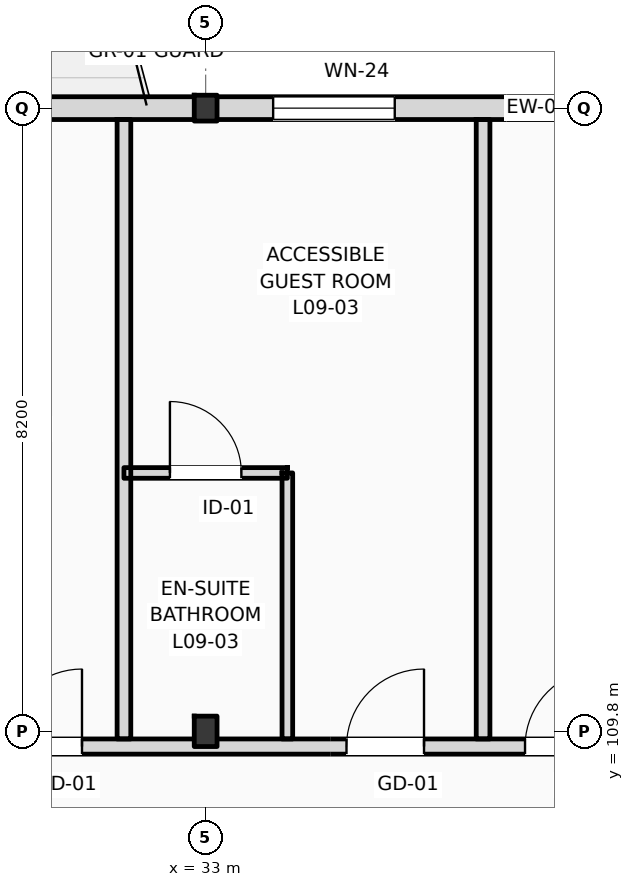
"""IFC4 building model, lengths in metres.
Left out: names, types, materials, properties, quantities, classifications, styles, units other than length and angle.
Written with IfcOpenShell. Run it as: python <this file> out.ifc"""

import sys

from ifc_helpers import new_model, si_unit, direction, frame, frame_2d, origin, origin_2d, place, context, subcontext, project, spatial, rectangle, i_section, extrude, element, fill, save


model = new_model("IFC4")
c1 = context("Model", 3, precision=1e-05, world=origin(), true_north=direction((0.0, 1.0)))
c2 = subcontext(c1, "Body", "Model", "MODEL_VIEW")
j1 = project(units=[si_unit("LENGTHUNIT", "METRE"), si_unit("PLANEANGLEUNIT", "RADIAN")], contexts=[c1])
p1 = place(None, origin())
s1 = spatial("IfcSite", under=j1, at=p1, CompositionType="ELEMENT")
p2 = place(p1, origin())
s2 = spatial("IfcBuilding", under=s1, at=p2, CompositionType="ELEMENT")
p3 = place(p2, frame((0.0, 0.0, 39.0)))
s3 = spatial("IfcBuildingStorey", under=s2, at=p3, CompositionType="ELEMENT", Elevation=39.0)
p4 = place(p3, frame((33.0, 109.8, 0.0), z_axis=(0.0, 0.0, 1.0), x_axis=(1.0, 0.0, 0.0)))
e1 = element("IfcColumn", 1, at=p4, inside=s3, PredefinedType="COLUMN", context=c2, shape_type="SweptSolid", body=[
    extrude(i_section(OverallWidth=0.3, OverallDepth=0.4, WebThickness=0.013, FlangeThickness=0.024, FilletRadius=0.027, at=origin_2d()), origin(), (0.0, 0.0, 1.0), 3.6),
])
p5 = place(p3, frame((33.0, 118.0, 0.0), z_axis=(0.0, 0.0, 1.0), x_axis=(1.0, 0.0, 0.0)))
e2 = element("IfcColumn", 2, at=p5, inside=s3, PredefinedType="COLUMN", context=c2, shape_type="SweptSolid", body=[
    extrude(i_section(OverallWidth=0.3, OverallDepth=0.34, WebThickness=0.012, FlangeThickness=0.021, FilletRadius=0.027, at=origin_2d()), origin(), (0.0, 0.0, 1.0), 3.6),
])
p6 = place(p3, frame((22.5, 118.0, 0.0), z_axis=(0.0, 0.0, 1.0), x_axis=(1.0, 0.0, 0.0)))
e3 = element("IfcWall", 3, at=p6, inside=s3, PredefinedType="STANDARD", context=c2, shape_type="SweptSolid", body=[
    extrude(rectangle(XDim=72.9, YDim=0.3, at=frame_2d((36.45, 0.0))), origin(), (0.0, 0.0, 1.0), 2.92),
])
p7 = place(p6, frame((3.6, 0.0, 0.9)))
e4 = element("IfcOpeningElement", 4, at=p7, cuts=e3, PredefinedType="OPENING", context=c2, shape_type="SweptSolid", body=[
    extrude(rectangle(XDim=1.1, YDim=1.6, at=frame_2d((0.55, 0.8))), frame((0.0, 0.16, 0.0), z_axis=(0.0, -1.0, 0.0), x_axis=(1.0, 0.0, 0.0)), (0.0, 0.0, 1.0), 0.32),
])
p8 = place(p6, frame((6.688, 0.0, 0.0)))
e5 = element("IfcOpeningElement", 5, at=p8, cuts=e3, PredefinedType="OPENING", context=c2, shape_type="SweptSolid", body=[
    extrude(rectangle(XDim=1.2, YDim=2.25, at=frame_2d((0.6, 1.125))), frame((0.0, 0.16, 0.0), z_axis=(0.0, -1.0, 0.0), x_axis=(1.0, 0.0, 0.0)), (0.0, 0.0, 1.0), 0.32),
])
p9 = place(p6, frame((11.388, 0.0, 0.9)))
e6 = element("IfcOpeningElement", 6, at=p9, cuts=e3, PredefinedType="OPENING", context=c2, shape_type="SweptSolid", body=[
    extrude(rectangle(XDim=1.6, YDim=1.75, at=frame_2d((0.8, 0.875))), frame((0.0, 0.16, 0.0), z_axis=(0.0, -1.0, 0.0), x_axis=(1.0, 0.0, 0.0)), (0.0, 0.0, 1.0), 0.32),
])
p10 = place(p6, frame((15.413, 0.0, 0.9)))
e7 = element("IfcOpeningElement", 7, at=p10, cuts=e3, PredefinedType="OPENING", context=c2, shape_type="SweptSolid", body=[
    extrude(rectangle(XDim=1.75, YDim=1.84, at=frame_2d((0.875, 0.92))), frame((0.0, 0.16, 0.0), z_axis=(0.0, -1.0, 0.0), x_axis=(1.0, 0.0, 0.0)), (0.0, 0.0, 1.0), 0.32),
])
p11 = place(p6, frame((21.245, 0.0, 0.0)))
e8 = element("IfcOpeningElement", 8, at=p11, cuts=e3, PredefinedType="OPENING", context=c2, shape_type="SweptSolid", body=[
    extrude(rectangle(XDim=1.2, YDim=2.25, at=frame_2d((0.6, 1.125))), frame((0.0, 0.16, 0.0), z_axis=(0.0, -1.0, 0.0), x_axis=(1.0, 0.0, 0.0)), (0.0, 0.0, 1.0), 0.32),
])
p12 = place(p6, frame((23.705, 0.0, 0.0)))
e9 = element("IfcOpeningElement", 9, at=p12, cuts=e3, PredefinedType="OPENING", context=c2, shape_type="SweptSolid", body=[
    extrude(rectangle(XDim=1.2, YDim=2.25, at=frame_2d((0.6, 1.125))), frame((0.0, 0.16, 0.0), z_axis=(0.0, -1.0, 0.0), x_axis=(1.0, 0.0, 0.0)), (0.0, 0.0, 1.0), 0.32),
])
p13 = place(p6, frame((28.488, 0.0, 0.9)))
e10 = element("IfcOpeningElement", 10, at=p13, cuts=e3, PredefinedType="OPENING", context=c2, shape_type="SweptSolid", body=[
    extrude(rectangle(XDim=2.6, YDim=1.84, at=frame_2d((1.3, 0.92))), frame((0.0, 0.16, 0.0), z_axis=(0.0, -1.0, 0.0), x_axis=(1.0, 0.0, 0.0)), (0.0, 0.0, 1.0), 0.32),
])
p14 = place(p6, frame((34.76, 0.0, 0.9)))
e11 = element("IfcOpeningElement", 11, at=p14, cuts=e3, PredefinedType="OPENING", context=c2, shape_type="SweptSolid", body=[
    extrude(rectangle(XDim=1.1, YDim=1.84, at=frame_2d((0.55, 0.92))), frame((0.0, 0.16, 0.0), z_axis=(0.0, -1.0, 0.0), x_axis=(1.0, 0.0, 0.0)), (0.0, 0.0, 1.0), 0.32),
])
p15 = place(p6, frame((38.143, 0.0, 0.0)))
e12 = element("IfcOpeningElement", 12, at=p15, cuts=e3, PredefinedType="OPENING", context=c2, shape_type="SweptSolid", body=[
    extrude(rectangle(XDim=1.2, YDim=2.25, at=frame_2d((0.6, 1.125))), frame((0.0, 0.16, 0.0), z_axis=(0.0, -1.0, 0.0), x_axis=(1.0, 0.0, 0.0)), (0.0, 0.0, 1.0), 0.32),
])
p16 = place(p6, frame((42.687, 0.0, 0.9)))
e13 = element("IfcOpeningElement", 13, at=p16, cuts=e3, PredefinedType="OPENING", context=c2, shape_type="SweptSolid", body=[
    extrude(rectangle(XDim=1.2, YDim=1.8, at=frame_2d((0.6, 0.9))), frame((0.0, 0.16, 0.0), z_axis=(0.0, -1.0, 0.0), x_axis=(1.0, 0.0, 0.0)), (0.0, 0.0, 1.0), 0.32),
])
p17 = place(p6, frame((47.112, 0.0, 0.9)))
e14 = element("IfcOpeningElement", 14, at=p17, cuts=e3, PredefinedType="OPENING", context=c2, shape_type="SweptSolid", body=[
    extrude(rectangle(XDim=1.35, YDim=1.84, at=frame_2d((0.675, 0.92))), frame((0.0, 0.16, 0.0), z_axis=(0.0, -1.0, 0.0), x_axis=(1.0, 0.0, 0.0)), (0.0, 0.0, 1.0), 0.32),
])
p18 = place(p6, frame((52.482, 0.0, 0.0)))
e15 = element("IfcOpeningElement", 15, at=p18, cuts=e3, PredefinedType="OPENING", context=c2, shape_type="SweptSolid", body=[
    extrude(rectangle(XDim=1.2, YDim=2.25, at=frame_2d((0.6, 1.125))), frame((0.0, 0.16, 0.0), z_axis=(0.0, -1.0, 0.0), x_axis=(1.0, 0.0, 0.0)), (0.0, 0.0, 1.0), 0.32),
])
p19 = place(p6, frame((54.942, 0.0, 0.0)))
e16 = element("IfcOpeningElement", 16, at=p19, cuts=e3, PredefinedType="OPENING", context=c2, shape_type="SweptSolid", body=[
    extrude(rectangle(XDim=1.2, YDim=2.25, at=frame_2d((0.6, 1.125))), frame((0.0, 0.16, 0.0), z_axis=(0.0, -1.0, 0.0), x_axis=(1.0, 0.0, 0.0)), (0.0, 0.0, 1.0), 0.32),
])
p20 = place(p6, frame((60.387, 0.0, 0.9)))
e17 = element("IfcOpeningElement", 17, at=p20, cuts=e3, PredefinedType="OPENING", context=c2, shape_type="SweptSolid", body=[
    extrude(rectangle(XDim=1.8, YDim=1.84, at=frame_2d((0.9, 0.92))), frame((0.0, 0.16, 0.0), z_axis=(0.0, -1.0, 0.0), x_axis=(1.0, 0.0, 0.0)), (0.0, 0.0, 1.0), 0.32),
])
p21 = place(p6, frame((66.013, 0.0, 0.9)))
e18 = element("IfcOpeningElement", 18, at=p21, cuts=e3, PredefinedType="OPENING", context=c2, shape_type="SweptSolid", body=[
    extrude(rectangle(XDim=1.35, YDim=1.84, at=frame_2d((0.675, 0.92))), frame((0.0, 0.16, 0.0), z_axis=(0.0, -1.0, 0.0), x_axis=(1.0, 0.0, 0.0)), (0.0, 0.0, 1.0), 0.32),
])
p22 = place(p6, frame((69.275, 0.0, 0.9)))
e19 = element("IfcOpeningElement", 19, at=p22, cuts=e3, PredefinedType="OPENING", context=c2, shape_type="SweptSolid", body=[
    extrude(rectangle(XDim=2.1, YDim=1.84, at=frame_2d((1.05, 0.92))), frame((0.0, 0.16, 0.0), z_axis=(0.0, -1.0, 0.0), x_axis=(1.0, 0.0, 0.0)), (0.0, 0.0, 1.0), 0.32),
])
p23 = place(p3, frame((10.65, 109.6, 0.0), z_axis=(0.0, 0.0, 1.0), x_axis=(1.0, 0.0, 0.0)))
e20 = element("IfcWall", 20, at=p23, inside=s3, PredefinedType="PARTITIONING", context=c2, shape_type="SweptSolid", body=[
    extrude(rectangle(XDim=84.61, YDim=0.2, at=frame_2d((42.305, 0.0))), origin(), (0.0, 0.0, 1.0), 2.82),
])
p24 = place(p23, frame((15.49, 0.0, 0.0)))
e21 = element("IfcOpeningElement", 21, at=p24, cuts=e20, PredefinedType="OPENING", context=c2, shape_type="SweptSolid", body=[
    extrude(rectangle(XDim=1.02, YDim=2.2, at=frame_2d((0.51, 1.1))), frame((0.0, 0.11, 0.0), z_axis=(0.0, -1.0, 0.0), x_axis=(1.0, 0.0, 0.0)), (0.0, 0.0, 1.0), 0.22),
])
p25 = place(p23, frame((19.703, 0.0, 0.0)))
e22 = element("IfcOpeningElement", 22, at=p25, cuts=e20, PredefinedType="OPENING", context=c2, shape_type="SweptSolid", body=[
    extrude(rectangle(XDim=1.02, YDim=2.2, at=frame_2d((0.51, 1.1))), frame((0.0, 0.11, 0.0), z_axis=(0.0, -1.0, 0.0), x_axis=(1.0, 0.0, 0.0)), (0.0, 0.0, 1.0), 0.22),
])
p26 = place(p23, frame((24.203, 0.0, 0.0)))
e23 = element("IfcOpeningElement", 23, at=p26, cuts=e20, PredefinedType="OPENING", context=c2, shape_type="SweptSolid", body=[
    extrude(rectangle(XDim=1.02, YDim=2.2, at=frame_2d((0.51, 1.1))), frame((0.0, 0.11, 0.0), z_axis=(0.0, -1.0, 0.0), x_axis=(1.0, 0.0, 0.0)), (0.0, 0.0, 1.0), 0.22),
])
p27 = place(p23, frame((26.552, 0.0, 0.0)))
e24 = element("IfcOpeningElement", 24, at=p27, cuts=e20, PredefinedType="OPENING", context=c2, shape_type="SweptSolid", body=[
    extrude(rectangle(XDim=1.02, YDim=2.2, at=frame_2d((0.51, 1.1))), frame((0.0, 0.11, 0.0), z_axis=(0.0, -1.0, 0.0), x_axis=(1.0, 0.0, 0.0)), (0.0, 0.0, 1.0), 0.22),
])
p28 = place(p23, frame((33.233, 0.0, 0.0)))
e25 = element("IfcOpeningElement", 25, at=p28, cuts=e20, PredefinedType="OPENING", context=c2, shape_type="SweptSolid", body=[
    extrude(rectangle(XDim=0.96, YDim=2.2, at=frame_2d((0.48, 1.1))), frame((0.0, 0.11, 0.0), z_axis=(0.0, -1.0, 0.0), x_axis=(1.0, 0.0, 0.0)), (0.0, 0.0, 1.0), 0.22),
])
p29 = place(p23, frame((35.583, 0.0, 0.0)))
e26 = element("IfcOpeningElement", 26, at=p29, cuts=e20, PredefinedType="OPENING", context=c2, shape_type="SweptSolid", body=[
    extrude(rectangle(XDim=0.96, YDim=2.2, at=frame_2d((0.48, 1.1))), frame((0.0, 0.11, 0.0), z_axis=(0.0, -1.0, 0.0), x_axis=(1.0, 0.0, 0.0)), (0.0, 0.0, 1.0), 0.22),
])
p30 = place(p23, frame((42.233, 0.0, 0.0)))
e27 = element("IfcOpeningElement", 27, at=p30, cuts=e20, PredefinedType="OPENING", context=c2, shape_type="SweptSolid", body=[
    extrude(rectangle(XDim=0.96, YDim=2.2, at=frame_2d((0.48, 1.1))), frame((0.0, 0.11, 0.0), z_axis=(0.0, -1.0, 0.0), x_axis=(1.0, 0.0, 0.0)), (0.0, 0.0, 1.0), 0.22),
])
p31 = place(p23, frame((46.983, 0.0, 0.0)))
e28 = element("IfcOpeningElement", 28, at=p31, cuts=e20, PredefinedType="OPENING", context=c2, shape_type="SweptSolid", body=[
    extrude(rectangle(XDim=0.96, YDim=2.2, at=frame_2d((0.48, 1.1))), frame((0.0, 0.11, 0.0), z_axis=(0.0, -1.0, 0.0), x_axis=(1.0, 0.0, 0.0)), (0.0, 0.0, 1.0), 0.22),
])
p32 = place(p23, frame((51.233, 0.0, 0.0)))
e29 = element("IfcOpeningElement", 29, at=p32, cuts=e20, PredefinedType="OPENING", context=c2, shape_type="SweptSolid", body=[
    extrude(rectangle(XDim=0.96, YDim=2.2, at=frame_2d((0.48, 1.1))), frame((0.0, 0.11, 0.0), z_axis=(0.0, -1.0, 0.0), x_axis=(1.0, 0.0, 0.0)), (0.0, 0.0, 1.0), 0.22),
])
p33 = place(p23, frame((55.733, 0.0, 0.0)))
e30 = element("IfcOpeningElement", 30, at=p33, cuts=e20, PredefinedType="OPENING", context=c2, shape_type="SweptSolid", body=[
    extrude(rectangle(XDim=0.96, YDim=2.2, at=frame_2d((0.48, 1.1))), frame((0.0, 0.11, 0.0), z_axis=(0.0, -1.0, 0.0), x_axis=(1.0, 0.0, 0.0)), (0.0, 0.0, 1.0), 0.22),
])
p34 = place(p23, frame((58.083, 0.0, 0.0)))
e31 = element("IfcOpeningElement", 31, at=p34, cuts=e20, PredefinedType="OPENING", context=c2, shape_type="SweptSolid", body=[
    extrude(rectangle(XDim=0.96, YDim=2.2, at=frame_2d((0.48, 1.1))), frame((0.0, 0.11, 0.0), z_axis=(0.0, -1.0, 0.0), x_axis=(1.0, 0.0, 0.0)), (0.0, 0.0, 1.0), 0.22),
])
p35 = place(p23, frame((64.732, 0.0, 0.0)))
e32 = element("IfcOpeningElement", 32, at=p35, cuts=e20, PredefinedType="OPENING", context=c2, shape_type="SweptSolid", body=[
    extrude(rectangle(XDim=0.96, YDim=2.2, at=frame_2d((0.48, 1.1))), frame((0.0, 0.11, 0.0), z_axis=(0.0, -1.0, 0.0), x_axis=(1.0, 0.0, 0.0)), (0.0, 0.0, 1.0), 0.22),
])
p36 = place(p23, frame((66.832, 0.0, 0.0)))
e33 = element("IfcOpeningElement", 33, at=p36, cuts=e20, PredefinedType="OPENING", context=c2, shape_type="SweptSolid", body=[
    extrude(rectangle(XDim=0.96, YDim=2.2, at=frame_2d((0.48, 1.1))), frame((0.0, 0.11, 0.0), z_axis=(0.0, -1.0, 0.0), x_axis=(1.0, 0.0, 0.0)), (0.0, 0.0, 1.0), 0.22),
])
p37 = place(p23, frame((73.732, 0.0, 0.0)))
e34 = element("IfcOpeningElement", 34, at=p37, cuts=e20, PredefinedType="OPENING", context=c2, shape_type="SweptSolid", body=[
    extrude(rectangle(XDim=0.96, YDim=2.2, at=frame_2d((0.48, 1.1))), frame((0.0, 0.11, 0.0), z_axis=(0.0, -1.0, 0.0), x_axis=(1.0, 0.0, 0.0)), (0.0, 0.0, 1.0), 0.22),
])
p38 = place(p23, frame((78.233, 0.0, 0.0)))
e35 = element("IfcOpeningElement", 35, at=p38, cuts=e20, PredefinedType="OPENING", context=c2, shape_type="SweptSolid", body=[
    extrude(rectangle(XDim=0.96, YDim=2.2, at=frame_2d((0.48, 1.1))), frame((0.0, 0.11, 0.0), z_axis=(0.0, -1.0, 0.0), x_axis=(1.0, 0.0, 0.0)), (0.0, 0.0, 1.0), 0.22),
])
p39 = place(p23, frame((80.62, 0.0, 0.0)))
e36 = element("IfcOpeningElement", 36, at=p39, cuts=e20, PredefinedType="OPENING", context=c2, shape_type="SweptSolid", body=[
    extrude(rectangle(XDim=0.96, YDim=2.2, at=frame_2d((0.48, 1.1))), frame((0.0, 0.11, 0.0), z_axis=(0.0, -1.0, 0.0), x_axis=(1.0, 0.0, 0.0)), (0.0, 0.0, 1.0), 0.22),
])
p40 = place(p23, frame((2.716, 0.0, 0.0)))
e37 = element("IfcOpeningElement", 37, at=p40, cuts=e20, PredefinedType="OPENING", context=c2, shape_type="SweptSolid", body=[
    extrude(rectangle(XDim=1.35, YDim=2.25, at=frame_2d((0.675, 1.125))), frame((0.0, 0.11, 0.0), z_axis=(0.0, -1.0, 0.0), x_axis=(1.0, 0.0, 0.0)), (0.0, 0.0, 1.0), 0.22),
])
p41 = place(p23, frame((6.65, 0.0, 0.0)))
e38 = element("IfcOpeningElement", 38, at=p41, cuts=e20, PredefinedType="OPENING", context=c2, shape_type="SweptSolid", body=[
    extrude(rectangle(XDim=1.35, YDim=2.25, at=frame_2d((0.675, 1.125))), frame((0.0, 0.11, 0.0), z_axis=(0.0, -1.0, 0.0), x_axis=(1.0, 0.0, 0.0)), (0.0, 0.0, 1.0), 0.22),
])
p42 = place(p23, frame((10.583, 0.0, 0.0)))
e39 = element("IfcOpeningElement", 39, at=p42, cuts=e20, PredefinedType="OPENING", context=c2, shape_type="SweptSolid", body=[
    extrude(rectangle(XDim=1.35, YDim=2.25, at=frame_2d((0.675, 1.125))), frame((0.0, 0.11, 0.0), z_axis=(0.0, -1.0, 0.0), x_axis=(1.0, 0.0, 0.0)), (0.0, 0.0, 1.0), 0.22),
])
for number, where, z_axis, x_axis in (
    (40, (31.925, 109.7, 0.0), (0.0, 0.0, 1.0), (0.0, 1.0, 0.0)),
    (41, (36.65, 109.7, 0.0), (0.0, 0.0, 1.0), (0.0, 1.0, 0.0)),
):
    element("IfcWall", number, at=place(p3, frame(where, z_axis=z_axis, x_axis=x_axis)), inside=s3, PredefinedType="PARTITIONING", context=c2, shape_type="SweptSolid", body=[
        extrude(rectangle(XDim=8.15, YDim=0.18, at=frame_2d((4.075, 0.0))), origin(), (0.0, 0.0, 1.0), 3.38),
    ])
p43 = place(p3, frame((34.075, 109.7, 0.0), z_axis=(0.0, 0.0, 1.0), x_axis=(0.0, 1.0, 0.0)))
e42 = element("IfcWall", 42, at=p43, inside=s3, PredefinedType="PARTITIONING", context=c2, shape_type="SweptSolid", body=[
    extrude(rectangle(XDim=3.5, YDim=0.14, at=frame_2d((1.75, 0.0))), origin(), (0.0, 0.0, 1.0), 3.38),
])
p44 = place(p3, frame((31.925, 113.2, 0.0), z_axis=(0.0, 0.0, 1.0), x_axis=(1.0, 0.0, 0.0)))
e43 = element("IfcWall", 43, at=p44, inside=s3, PredefinedType="PARTITIONING", context=c2, shape_type="SweptSolid", body=[
    extrude(rectangle(XDim=2.15, YDim=0.14, at=frame_2d((1.075, 0.0))), origin(), (0.0, 0.0, 1.0), 3.38),
])
p45 = place(p44, frame((0.605, 0.0, 0.0)))
e44 = element("IfcOpeningElement", 44, at=p45, cuts=e43, PredefinedType="OPENING", context=c2, shape_type="SweptSolid", body=[
    extrude(rectangle(XDim=0.94, YDim=2.15, at=frame_2d((0.47, 1.075))), frame((0.0, 0.08, 0.0), z_axis=(0.0, -1.0, 0.0), x_axis=(1.0, 0.0, 0.0)), (0.0, 0.0, 1.0), 0.16),
])
p46 = place(p9, origin())
e45 = element("IfcWindow", 45, at=p46, inside=s3, PartitioningType="DOUBLE_PANEL_VERTICAL", PredefinedType="WINDOW", context=c2, shape_type="SweptSolid", body=[
    extrude(rectangle(XDim=1.6, YDim=1.75, at=frame_2d((0.8, 0.875))), frame((0.0, 0.03, 0.0), z_axis=(0.0, -1.0, 0.0), x_axis=(1.0, 0.0, 0.0)), (0.0, 0.0, 1.0), 0.06),
])
fill(e6, e45)
p47 = place(p25, origin())
e46 = element("IfcDoor", 46, at=p47, inside=s3, OperationType="SINGLE_SWING_RIGHT", PredefinedType="DOOR", context=c2, shape_type="SweptSolid", body=[
    extrude(rectangle(XDim=1.02, YDim=2.2, at=frame_2d((0.51, 1.1))), frame((0.0, 0.025, 0.0), z_axis=(0.0, -1.0, 0.0), x_axis=(1.0, 0.0, 0.0)), (0.0, 0.0, 1.0), 0.05),
])
fill(e22, e46)
p48 = place(p26, origin())
e47 = element("IfcDoor", 47, at=p48, inside=s3, OperationType="SINGLE_SWING_RIGHT", PredefinedType="DOOR", context=c2, shape_type="SweptSolid", body=[
    extrude(rectangle(XDim=1.02, YDim=2.2, at=frame_2d((0.51, 1.1))), frame((0.0, 0.025, 0.0), z_axis=(0.0, -1.0, 0.0), x_axis=(1.0, 0.0, 0.0)), (0.0, 0.0, 1.0), 0.05),
])
fill(e23, e47)
p49 = place(p45, origin())
e48 = element("IfcDoor", 48, at=p49, inside=s3, OperationType="SINGLE_SWING_LEFT", PredefinedType="DOOR", context=c2, shape_type="SweptSolid", body=[
    extrude(rectangle(XDim=0.94, YDim=2.15, at=frame_2d((0.47, 1.075))), frame((0.0, 0.025, 0.0), z_axis=(0.0, -1.0, 0.0), x_axis=(1.0, 0.0, 0.0)), (0.0, 0.0, 1.0), 0.05),
])
fill(e44, e48)
p50 = place(p27, origin())
e49 = element("IfcDoor", 49, at=p50, inside=s3, OperationType="SINGLE_SWING_RIGHT", PredefinedType="DOOR", context=c2, shape_type="SweptSolid", body=[
    extrude(rectangle(XDim=1.02, YDim=2.2, at=frame_2d((0.51, 1.1))), frame((0.0, 0.025, 0.0), z_axis=(0.0, -1.0, 0.0), x_axis=(1.0, 0.0, 0.0)), (0.0, 0.0, 1.0), 0.05),
])
fill(e24, e49)
save(model, sys.argv[1])
